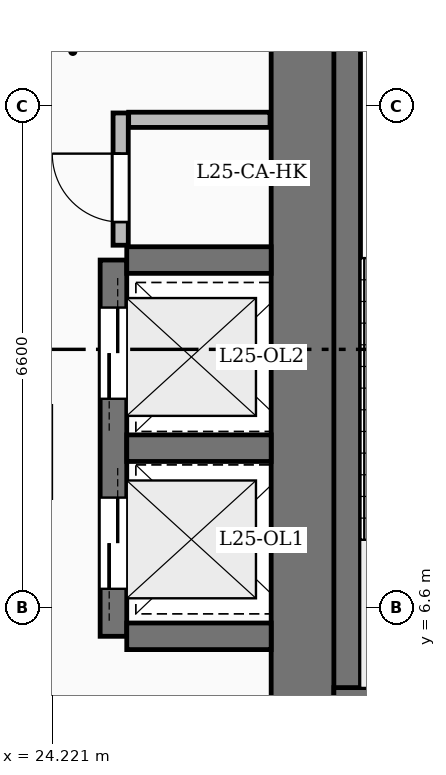
"""IFC4 building model, lengths in metres.
Left out: names, types, materials, properties, quantities, classifications, styles, units other than length and angle.
Written with IfcOpenShell. Run it as: python <this file> out.ifc"""

import sys

from ifc_helpers import new_model, si_unit, direction, frame, frame_2d, origin, place, context, subcontext, project, spatial, rectangle, extrude, element, fill, save


model = new_model("IFC4")
c1 = context("Model", 3, precision=1e-05, world=origin(), true_north=direction((0.0, 1.0)))
c2 = subcontext(c1, "Body", "Model", "MODEL_VIEW")
j1 = project(units=[si_unit("LENGTHUNIT", "METRE"), si_unit("PLANEANGLEUNIT", "RADIAN")], contexts=[c1])
p1 = place(None, origin())
s1 = spatial("IfcSite", under=j1, at=p1, CompositionType="ELEMENT")
p2 = place(p1, origin())
s2 = spatial("IfcBuilding", under=s1, at=p2, CompositionType="ELEMENT")
p3 = place(p2, frame((0.0, 0.0, 100.2)))
s3 = spatial("IfcBuildingStorey", under=s2, at=p3, CompositionType="ELEMENT", Elevation=100.2)
p4 = place(p3, frame((27.55, 5.25, 0.0), z_axis=(0.0, 0.0, 1.0), x_axis=(0.0, 1.0, 0.0)))
e1 = element("IfcWall", 1, at=p4, inside=s3, PredefinedType="SHEAR", context=c2, shape_type="SweptSolid", body=[
    extrude(rectangle(XDim=8.8, YDim=0.9, at=frame_2d((4.4, 0.0))), origin(), (0.0, 0.0, 1.0), 4.8),
])
p5 = place(p3, frame((28.1, 5.2, 0.0), z_axis=(0.0, 0.0, 1.0), x_axis=(0.0, 1.0, 0.0)))
e2 = element("IfcWall", 2, at=p5, inside=s3, PredefinedType="SOLIDWALL", context=c2, shape_type="SweptSolid", body=[
    extrude(rectangle(XDim=9.1, YDim=0.35, at=frame_2d((4.55, 0.0))), origin(), (0.0, 0.0, 1.0), 4.8),
])
p6 = place(p3, frame((27.925, 5.375, 0.0), z_axis=(0.0, 0.0, 1.0), x_axis=(1.0, 0.0, 0.0)))
e3 = element("IfcWall", 3, at=p6, inside=s3, PredefinedType="SOLIDWALL", context=c2, shape_type="SweptSolid", body=[
    extrude(rectangle(XDim=3.55, YDim=0.35, at=frame_2d((1.775, 0.0))), origin(), (0.0, 0.0, 1.0), 4.8),
])
p7 = place(p3, frame((25.025, 6.225, 0.0), z_axis=(0.0, 0.0, 1.0), x_axis=(0.0, 1.0, 0.0)))
e4 = element("IfcWall", 4, at=p7, inside=s3, PredefinedType="SOLIDWALL", context=c2, shape_type="SweptSolid", body=[
    extrude(rectangle(XDim=4.95, YDim=0.35, at=frame_2d((2.475, 0.0))), origin(), (0.0, 0.0, 1.0), 4.8),
])
p8 = place(p7, frame((0.625, 0.0, 0.0)))
e5 = element("IfcOpeningElement", 5, at=p8, cuts=e4, PredefinedType="OPENING", context=c2, shape_type="SweptSolid", body=[
    extrude(rectangle(XDim=1.2, YDim=2.2, at=frame_2d((0.6, 1.1))), frame((0.0, 0.185, 0.0), z_axis=(0.0, -1.0, 0.0), x_axis=(1.0, 0.0, 0.0)), (0.0, 0.0, 1.0), 0.37),
])
p9 = place(p7, frame((3.125, 0.0, 0.0)))
e6 = element("IfcOpeningElement", 6, at=p9, cuts=e4, PredefinedType="OPENING", context=c2, shape_type="SweptSolid", body=[
    extrude(rectangle(XDim=1.2, YDim=2.2, at=frame_2d((0.6, 1.1))), frame((0.0, 0.185, 0.0), z_axis=(0.0, -1.0, 0.0), x_axis=(1.0, 0.0, 0.0)), (0.0, 0.0, 1.0), 0.37),
])
for number, where, z_axis, x_axis in (
    (7, (25.2, 6.225, 0.0), (0.0, 0.0, 1.0), (1.0, 0.0, 0.0)),
    (8, (25.2, 8.7, 0.0), (0.0, 0.0, 1.0), (1.0, 0.0, 0.0)),
    (9, (25.2, 11.175, 0.0), (0.0, 0.0, 1.0), (1.0, 0.0, 0.0)),
):
    element("IfcWall", number, at=place(p3, frame(where, z_axis=z_axis, x_axis=x_axis)), inside=s3, PredefinedType="SOLIDWALL", context=c2, shape_type="SweptSolid", body=[
        extrude(rectangle(XDim=1.9, YDim=0.35, at=frame_2d((0.95, 0.0))), origin(), (0.0, 0.0, 1.0), 4.8),
    ])
p10 = place(p3, frame((25.12, 11.37, 0.0), z_axis=(0.0, 0.0, 1.0), x_axis=(0.0, 1.0, 0.0)))
e10 = element("IfcWall", 10, at=p10, inside=s3, PredefinedType="PARTITIONING", context=c2, shape_type="SweptSolid", body=[
    extrude(rectangle(XDim=1.74, YDim=0.2, at=frame_2d((0.87, 0.0))), origin(), (0.0, 0.0, 1.0), 4.5),
])
p11 = place(p10, frame((0.305, 0.0, 0.0)))
e11 = element("IfcOpeningElement", 11, at=p11, cuts=e10, PredefinedType="OPENING", context=c2, shape_type="SweptSolid", body=[
    extrude(rectangle(XDim=0.9, YDim=2.1, at=frame_2d((0.45, 1.05))), frame((0.0, 0.11, 0.0), z_axis=(0.0, -1.0, 0.0), x_axis=(1.0, 0.0, 0.0)), (0.0, 0.0, 1.0), 0.22),
])
p12 = place(p3, frame((25.225, 13.02, 0.0), z_axis=(0.0, 0.0, 1.0), x_axis=(1.0, 0.0, 0.0)))
e12 = element("IfcWall", 12, at=p12, inside=s3, PredefinedType="PARTITIONING", context=c2, shape_type="SweptSolid", body=[
    extrude(rectangle(XDim=1.86, YDim=0.2, at=frame_2d((0.93, 0.0))), origin(), (0.0, 0.0, 1.0), 4.5),
])
p13 = place(p8, origin())
e13 = element("IfcDoor", 13, at=p13, inside=s3, OperationType="DOUBLE_DOOR_SLIDING", PredefinedType="DOOR", context=c2, shape_type="SweptSolid", body=[
    extrude(rectangle(XDim=1.2, YDim=2.2, at=frame_2d((0.6, 1.1))), frame((0.0, 0.025, 0.0), z_axis=(0.0, -1.0, 0.0), x_axis=(1.0, 0.0, 0.0)), (0.0, 0.0, 1.0), 0.05),
])
fill(e5, e13)
p14 = place(p9, origin())
e14 = element("IfcDoor", 14, at=p14, inside=s3, OperationType="DOUBLE_DOOR_SLIDING", PredefinedType="DOOR", context=c2, shape_type="SweptSolid", body=[
    extrude(rectangle(XDim=1.2, YDim=2.2, at=frame_2d((0.6, 1.1))), frame((0.0, 0.025, 0.0), z_axis=(0.0, -1.0, 0.0), x_axis=(1.0, 0.0, 0.0)), (0.0, 0.0, 1.0), 0.05),
])
fill(e6, e14)
p15 = place(p11, origin())
e15 = element("IfcDoor", 15, at=p15, inside=s3, OperationType="SINGLE_SWING_RIGHT", PredefinedType="DOOR", context=c2, shape_type="SweptSolid", body=[
    extrude(rectangle(XDim=0.9, YDim=2.1, at=frame_2d((0.45, 1.05))), frame((0.0, 0.025, 0.0), z_axis=(0.0, -1.0, 0.0), x_axis=(1.0, 0.0, 0.0)), (0.0, 0.0, 1.0), 0.05),
])
fill(e11, e15)
save(model, sys.argv[1])
